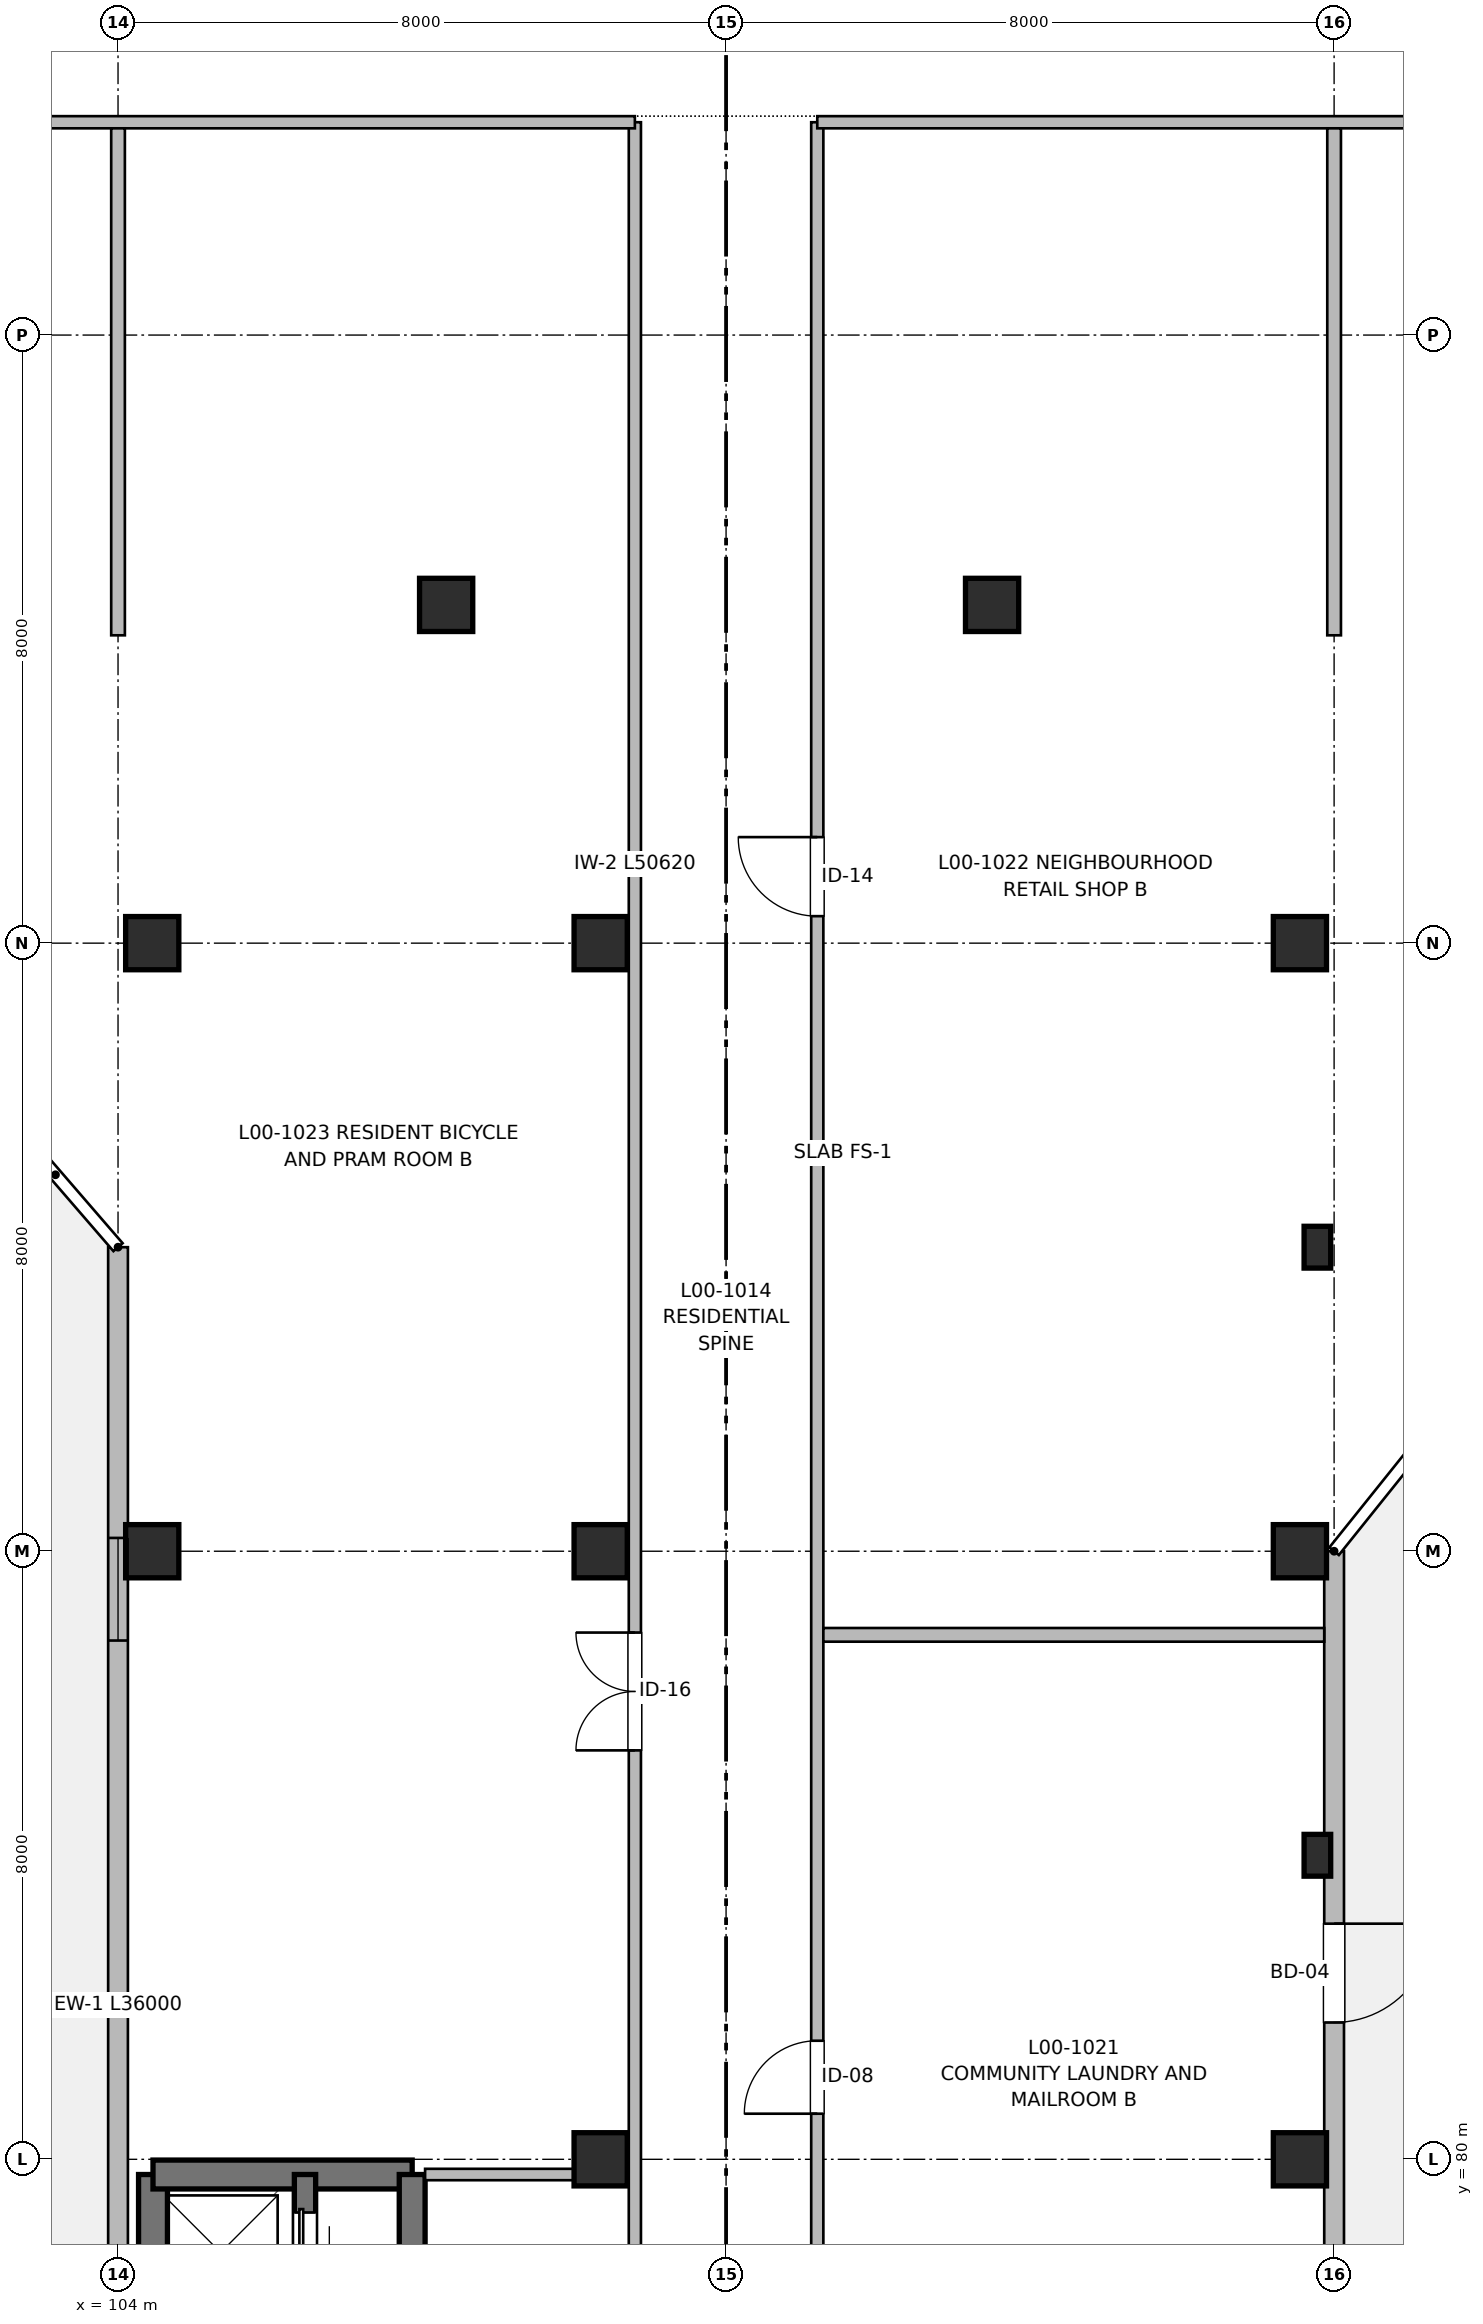
"""IFC4 building model, lengths in metres.
Left out: names, types, materials, properties, quantities, classifications, styles, units other than length and angle.
Written with IfcOpenShell. Run it as: python <this file> out.ifc"""

import sys

from ifc_helpers import new_model, si_unit, direction, frame, frame_2d, origin, origin_2d, place, context, subcontext, project, spatial, rectangle, extrude, element, fill, save


model = new_model("IFC4")
c1 = context("Model", 3, precision=1e-05, world=origin(), true_north=direction((0.0, 1.0)))
c2 = subcontext(c1, "Body", "Model", "MODEL_VIEW")
j1 = project(units=[si_unit("LENGTHUNIT", "METRE"), si_unit("PLANEANGLEUNIT", "RADIAN")], contexts=[c1])
p1 = place(None, origin())
s1 = spatial("IfcSite", under=j1, at=p1, CompositionType="ELEMENT")
p2 = place(p1, origin())
s2 = spatial("IfcBuilding", under=s1, at=p2, CompositionType="ELEMENT")
p3 = place(p2, origin())
s3 = spatial("IfcBuildingStorey", under=s2, at=p3, CompositionType="ELEMENT", Elevation=0.0)
for number, where, z_axis, x_axis in (
    (1, (104.45, 88.0, 0.0), (0.0, 0.0, 1.0), (1.0, 0.0, 0.0)),
    (2, (104.45, 96.0, 0.0), (0.0, 0.0, 1.0), (1.0, 0.0, 0.0)),
    (3, (108.317, 100.45, 0.0), (0.0, 0.0, 1.0), (1.0, 0.0, 0.0)),
    (4, (110.35, 80.0, 0.0), (0.0, 0.0, 1.0), (1.0, 0.0, 0.0)),
    (5, (110.35, 88.0, 0.0), (0.0, 0.0, 1.0), (1.0, 0.0, 0.0)),
    (6, (110.35, 96.0, 0.0), (0.0, 0.0, 1.0), (1.0, 0.0, 0.0)),
    (7, (115.5, 100.45, 0.0), (0.0, 0.0, 1.0), (1.0, 0.0, 0.0)),
    (8, (119.55, 80.0, 0.0), (0.0, 0.0, 1.0), (1.0, 0.0, 0.0)),
    (9, (119.55, 88.0, 0.0), (0.0, 0.0, 1.0), (1.0, 0.0, 0.0)),
    (10, (119.55, 96.0, 0.0), (0.0, 0.0, 1.0), (1.0, 0.0, 0.0)),
):
    element("IfcColumn", number, at=place(p3, frame(where, z_axis=z_axis, x_axis=x_axis)), inside=s3, PredefinedType="COLUMN", context=c2, shape_type="SweptSolid", body=[
        extrude(rectangle(XDim=0.7, YDim=0.7, at=origin_2d()), origin(), (0.0, 0.0, 1.0), 4.16),
    ])
for number, where, z_axis, x_axis in (
    (11, (119.78, 84.0, 0.0), (0.0, 0.0, 1.0), (1.0, 0.0, 0.0)),
    (12, (119.78, 92.0, 0.0), (0.0, 0.0, 1.0), (1.0, 0.0, 0.0)),
):
    element("IfcColumn", number, at=place(p3, frame(where, z_axis=z_axis, x_axis=x_axis)), inside=s3, PredefinedType="PILASTER", context=c2, shape_type="SweptSolid", body=[
        extrude(rectangle(XDim=0.35, YDim=0.55, at=origin_2d()), origin(), (0.0, 0.0, 1.0), 4.16),
    ])
p4 = place(p3, frame((104.46, 67.35, 0.0), z_axis=(0.0, 0.0, 1.0), x_axis=(0.0, 1.0, 0.0)))
e13 = element("IfcWall", 13, at=p4, inside=s3, PredefinedType="SHEAR", context=c2, shape_type="SweptSolid", body=[
    extrude(rectangle(XDim=12.45, YDim=0.38, at=frame_2d((6.225, 0.0))), origin(), (0.0, 0.0, 1.0), 4.16),
])
p5 = place(p4, frame((2.2, 0.0, 1.2)))
e14 = element("IfcOpeningElement", 14, at=p5, cuts=e13, PredefinedType="OPENING", context=c2, shape_type="SweptSolid", body=[
    extrude(rectangle(XDim=0.95, YDim=1.25, at=frame_2d((0.475, 0.625))), frame((0.0, 0.2, 0.0), z_axis=(0.0, -1.0, 0.0), x_axis=(1.0, 0.0, 0.0)), (0.0, 0.0, 1.0), 0.4),
])
p6 = place(p3, frame((104.46, 79.8, 0.0), z_axis=(0.0, 0.0, 1.0), x_axis=(1.0, 0.0, 0.0)))
e15 = element("IfcWall", 15, at=p6, inside=s3, PredefinedType="SHEAR", context=c2, shape_type="SweptSolid", body=[
    extrude(rectangle(XDim=3.41, YDim=0.38, at=frame_2d((1.705, 0.0))), origin(), (0.0, 0.0, 1.0), 4.16),
])
p7 = place(p3, frame((107.87, 79.8, 0.0), z_axis=(0.0, 0.0, 1.0), x_axis=(0.0, -1.0, 0.0)))
e16 = element("IfcWall", 16, at=p7, inside=s3, PredefinedType="SHEAR", context=c2, shape_type="SweptSolid", body=[
    extrude(rectangle(XDim=12.45, YDim=0.34, at=frame_2d((6.225, 0.0))), origin(), (0.0, 0.0, 1.0), 4.16),
])
p8 = place(p7, frame((10.85, 0.0, 0.0)))
e17 = element("IfcOpeningElement", 17, at=p8, cuts=e16, PredefinedType="OPENING", context=c2, shape_type="SweptSolid", body=[
    extrude(rectangle(XDim=1.05, YDim=2.15, at=frame_2d((0.525, 1.075))), frame((0.0, 0.18, 0.0), z_axis=(0.0, -1.0, 0.0), x_axis=(1.0, 0.0, 0.0)), (0.0, 0.0, 1.0), 0.36),
])
p9 = place(p3, frame((106.46, 74.55, 0.0), z_axis=(0.0, 0.0, 1.0), x_axis=(0.0, 1.0, 0.0)))
e18 = element("IfcWall", 18, at=p9, inside=s3, PredefinedType="SHEAR", context=c2, shape_type="SweptSolid", body=[
    extrude(rectangle(XDim=5.25, YDim=0.28, at=frame_2d((2.625, 0.0))), origin(), (0.0, 0.0, 1.0), 4.16),
])
p10 = place(p9, frame((1.15, 0.0, 0.0)))
e19 = element("IfcOpeningElement", 19, at=p10, cuts=e18, PredefinedType="OPENING", context=c2, shape_type="SweptSolid", body=[
    extrude(rectangle(XDim=1.0, YDim=2.15, at=frame_2d((0.5, 1.075))), frame((0.0, 0.15, 0.0), z_axis=(0.0, -1.0, 0.0), x_axis=(1.0, 0.0, 0.0)), (0.0, 0.0, 1.0), 0.3),
])
p11 = place(p9, frame((3.85, 0.0, 0.0)))
e20 = element("IfcOpeningElement", 20, at=p11, cuts=e18, PredefinedType="OPENING", context=c2, shape_type="SweptSolid", body=[
    extrude(rectangle(XDim=0.9, YDim=2.15, at=frame_2d((0.45, 1.075))), frame((0.0, 0.15, 0.0), z_axis=(0.0, -1.0, 0.0), x_axis=(1.0, 0.0, 0.0)), (0.0, 0.0, 1.0), 0.3),
])
p12 = place(p3, frame((120.0, 88.0, 0.0), z_axis=(0.0, 0.0, 1.0), x_axis=(0.0, -1.0, 0.0)))
e21 = element("IfcWall", 21, at=p12, inside=s3, PredefinedType="SOLIDWALL", context=c2, shape_type="SweptSolid", body=[
    extrude(rectangle(XDim=32.0, YDim=0.26, at=frame_2d((16.0, 0.0))), origin(), (0.0, 0.0, 1.0), 3.94),
])
p13 = place(p12, frame((4.9, 0.0, 0.0)))
e22 = element("IfcOpeningElement", 22, at=p13, cuts=e21, PredefinedType="OPENING", context=c2, shape_type="SweptSolid", body=[
    extrude(rectangle(XDim=1.3, YDim=2.2, at=frame_2d((0.65, 1.1))), frame((0.0, 0.14, 0.0), z_axis=(0.0, -1.0, 0.0), x_axis=(1.0, 0.0, 0.0)), (0.0, 0.0, 1.0), 0.28),
])
p14 = place(p12, frame((10.025, 0.0, 0.95)))
e23 = element("IfcOpeningElement", 23, at=p14, cuts=e21, PredefinedType="OPENING", context=c2, shape_type="SweptSolid", body=[
    extrude(rectangle(XDim=1.35, YDim=1.3, at=frame_2d((0.675, 0.65))), frame((0.0, 0.14, 0.0), z_axis=(0.0, -1.0, 0.0), x_axis=(1.0, 0.0, 0.0)), (0.0, 0.0, 1.0), 0.28),
])
p15 = place(p12, frame((20.725, 0.0, 0.95)))
e24 = element("IfcOpeningElement", 24, at=p15, cuts=e21, PredefinedType="OPENING", context=c2, shape_type="SweptSolid", body=[
    extrude(rectangle(XDim=2.15, YDim=1.8, at=frame_2d((1.075, 0.9))), frame((0.0, 0.14, 0.0), z_axis=(0.0, -1.0, 0.0), x_axis=(1.0, 0.0, 0.0)), (0.0, 0.0, 1.0), 0.28),
])
p16 = place(p12, frame((27.325, 0.0, 0.95)))
e25 = element("IfcOpeningElement", 25, at=p16, cuts=e21, PredefinedType="OPENING", context=c2, shape_type="SweptSolid", body=[
    extrude(rectangle(XDim=1.35, YDim=1.3, at=frame_2d((0.675, 0.65))), frame((0.0, 0.14, 0.0), z_axis=(0.0, -1.0, 0.0), x_axis=(1.0, 0.0, 0.0)), (0.0, 0.0, 1.0), 0.28),
])
p17 = place(p3, frame((104.0, 56.0, 0.0), z_axis=(0.0, 0.0, 1.0), x_axis=(0.0, 1.0, 0.0)))
e26 = element("IfcWall", 26, at=p17, inside=s3, PredefinedType="SOLIDWALL", context=c2, shape_type="SweptSolid", body=[
    extrude(rectangle(XDim=36.0, YDim=0.26, at=frame_2d((18.0, 0.0))), origin(), (0.0, 0.0, 1.0), 3.94),
])
p18 = place(p17, frame((3.425, 0.0, 0.95)))
e27 = element("IfcOpeningElement", 27, at=p18, cuts=e26, PredefinedType="OPENING", context=c2, shape_type="SweptSolid", body=[
    extrude(rectangle(XDim=2.15, YDim=1.8, at=frame_2d((1.075, 0.9))), frame((0.0, 0.14, 0.0), z_axis=(0.0, -1.0, 0.0), x_axis=(1.0, 0.0, 0.0)), (0.0, 0.0, 1.0), 0.28),
])
p19 = place(p17, frame((12.825, 0.0, 0.95)))
e28 = element("IfcOpeningElement", 28, at=p19, cuts=e26, PredefinedType="OPENING", context=c2, shape_type="SweptSolid", body=[
    extrude(rectangle(XDim=1.35, YDim=1.3, at=frame_2d((0.675, 0.65))), frame((0.0, 0.14, 0.0), z_axis=(0.0, -1.0, 0.0), x_axis=(1.0, 0.0, 0.0)), (0.0, 0.0, 1.0), 0.28),
])
p20 = place(p17, frame((19.075, 0.0, 0.95)))
e29 = element("IfcOpeningElement", 29, at=p20, cuts=e26, PredefinedType="OPENING", context=c2, shape_type="SweptSolid", body=[
    extrude(rectangle(XDim=2.15, YDim=1.8, at=frame_2d((1.075, 0.9))), frame((0.0, 0.14, 0.0), z_axis=(0.0, -1.0, 0.0), x_axis=(1.0, 0.0, 0.0)), (0.0, 0.0, 1.0), 0.28),
])
p21 = place(p17, frame((30.825, 0.0, 0.95)))
e30 = element("IfcOpeningElement", 30, at=p21, cuts=e26, PredefinedType="OPENING", context=c2, shape_type="SweptSolid", body=[
    extrude(rectangle(XDim=1.35, YDim=1.3, at=frame_2d((0.675, 0.65))), frame((0.0, 0.14, 0.0), z_axis=(0.0, -1.0, 0.0), x_axis=(1.0, 0.0, 0.0)), (0.0, 0.0, 1.0), 0.28),
])
p22 = place(p3, frame((108.04, 79.8, 0.0), z_axis=(0.0, 0.0, 1.0), x_axis=(1.0, 0.0, 0.0)))
e31 = element("IfcWall", 31, at=p22, inside=s3, PredefinedType="PARTITIONING", context=c2, shape_type="SweptSolid", body=[
    extrude(rectangle(XDim=2.68, YDim=0.15, at=frame_2d((1.34, 0.0))), origin(), (0.0, 0.0, 1.0), 3.895),
])
p23 = place(p3, frame((110.8, 56.18, 0.0), z_axis=(0.0, 0.0, 1.0), x_axis=(0.0, 1.0, 0.0)))
e32 = element("IfcWall", 32, at=p23, inside=s3, PredefinedType="PARTITIONING", context=c2, shape_type="SweptSolid", body=[
    extrude(rectangle(XDim=50.62, YDim=0.16, at=frame_2d((25.31, 0.0))), origin(), (0.0, 0.0, 1.0), 3.895),
])
p24 = place(p23, frame((12.82, 0.0, 0.0)))
e33 = element("IfcOpeningElement", 33, at=p24, cuts=e32, PredefinedType="OPENING", context=c2, shape_type="SweptSolid", body=[
    extrude(rectangle(XDim=1.1, YDim=2.15, at=frame_2d((0.55, 1.075))), frame((0.0, 0.09, 0.0), z_axis=(0.0, -1.0, 0.0), x_axis=(1.0, 0.0, 0.0)), (0.0, 0.0, 1.0), 0.18),
])
p25 = place(p23, frame((19.22, 0.0, 0.0)))
e34 = element("IfcOpeningElement", 34, at=p25, cuts=e32, PredefinedType="OPENING", context=c2, shape_type="SweptSolid", body=[
    extrude(rectangle(XDim=1.6, YDim=2.15, at=frame_2d((0.8, 1.075))), frame((0.0, 0.09, 0.0), z_axis=(0.0, -1.0, 0.0), x_axis=(1.0, 0.0, 0.0)), (0.0, 0.0, 1.0), 0.18),
])
p26 = place(p23, frame((3.5, 0.0, 0.0)))
e35 = element("IfcOpeningElement", 35, at=p26, cuts=e32, PredefinedType="OPENING", context=c2, shape_type="SweptSolid", body=[
    extrude(rectangle(XDim=1.05, YDim=2.15, at=frame_2d((0.525, 1.075))), frame((0.0, 0.09, 0.0), z_axis=(0.0, -1.0, 0.0), x_axis=(1.0, 0.0, 0.0)), (0.0, 0.0, 1.0), 0.18),
])
p27 = place(p23, frame((29.2, 0.0, 0.0)))
e36 = element("IfcOpeningElement", 36, at=p27, cuts=e32, PredefinedType="OPENING", context=c2, shape_type="SweptSolid", body=[
    extrude(rectangle(XDim=1.55, YDim=2.2, at=frame_2d((0.775, 1.1))), frame((0.0, 0.09, 0.0), z_axis=(0.0, -1.0, 0.0), x_axis=(1.0, 0.0, 0.0)), (0.0, 0.0, 1.0), 0.18),
])
p28 = place(p3, frame((113.2, 56.18, 0.0), z_axis=(0.0, 0.0, 1.0), x_axis=(0.0, 1.0, 0.0)))
e37 = element("IfcWall", 37, at=p28, inside=s3, PredefinedType="PARTITIONING", context=c2, shape_type="SweptSolid", body=[
    extrude(rectangle(XDim=50.62, YDim=0.16, at=frame_2d((25.31, 0.0))), origin(), (0.0, 0.0, 1.0), 3.895),
])
p29 = place(p28, frame((2.515, 0.0, 0.0)))
e38 = element("IfcOpeningElement", 38, at=p29, cuts=e37, PredefinedType="OPENING", context=c2, shape_type="SweptSolid", body=[
    extrude(rectangle(XDim=1.0, YDim=2.1, at=frame_2d((0.5, 1.05))), frame((0.0, 0.09, 0.0), z_axis=(0.0, -1.0, 0.0), x_axis=(1.0, 0.0, 0.0)), (0.0, 0.0, 1.0), 0.18),
])
p30 = place(p28, frame((8.92, 0.0, 0.0)))
e39 = element("IfcOpeningElement", 39, at=p30, cuts=e37, PredefinedType="OPENING", context=c2, shape_type="SweptSolid", body=[
    extrude(rectangle(XDim=1.0, YDim=2.1, at=frame_2d((0.5, 1.05))), frame((0.0, 0.09, 0.0), z_axis=(0.0, -1.0, 0.0), x_axis=(1.0, 0.0, 0.0)), (0.0, 0.0, 1.0), 0.18),
])
p31 = place(p28, frame((15.42, 0.0, 0.0)))
e40 = element("IfcOpeningElement", 40, at=p31, cuts=e37, PredefinedType="OPENING", context=c2, shape_type="SweptSolid", body=[
    extrude(rectangle(XDim=1.0, YDim=2.1, at=frame_2d((0.5, 1.05))), frame((0.0, 0.09, 0.0), z_axis=(0.0, -1.0, 0.0), x_axis=(1.0, 0.0, 0.0)), (0.0, 0.0, 1.0), 0.18),
])
p32 = place(p28, frame((24.42, 0.0, 0.0)))
e41 = element("IfcOpeningElement", 41, at=p32, cuts=e37, PredefinedType="OPENING", context=c2, shape_type="SweptSolid", body=[
    extrude(rectangle(XDim=0.96, YDim=2.15, at=frame_2d((0.48, 1.075))), frame((0.0, 0.09, 0.0), z_axis=(0.0, -1.0, 0.0), x_axis=(1.0, 0.0, 0.0)), (0.0, 0.0, 1.0), 0.18),
])
p33 = place(p28, frame((40.175, 0.0, 0.0)))
e42 = element("IfcOpeningElement", 42, at=p33, cuts=e37, PredefinedType="OPENING", context=c2, shape_type="SweptSolid", body=[
    extrude(rectangle(XDim=1.04, YDim=2.15, at=frame_2d((0.52, 1.075))), frame((0.0, 0.09, 0.0), z_axis=(0.0, -1.0, 0.0), x_axis=(1.0, 0.0, 0.0)), (0.0, 0.0, 1.0), 0.18),
])
p34 = place(p3, frame((93.68, 106.8, 0.0), z_axis=(0.0, 0.0, 1.0), x_axis=(1.0, 0.0, 0.0)))
e43 = element("IfcWall", 43, at=p34, inside=s3, PredefinedType="PARTITIONING", context=c2, shape_type="SweptSolid", body=[
    extrude(rectangle(XDim=17.12, YDim=0.16, at=frame_2d((8.56, 0.0))), origin(), (0.0, 0.0, 1.0), 3.895),
])
p35 = place(p3, frame((113.2, 106.8, 0.0), z_axis=(0.0, 0.0, 1.0), x_axis=(1.0, 0.0, 0.0)))
e44 = element("IfcWall", 44, at=p35, inside=s3, PredefinedType="PARTITIONING", context=c2, shape_type="SweptSolid", body=[
    extrude(rectangle(XDim=24.12, YDim=0.16, at=frame_2d((12.06, 0.0))), origin(), (0.0, 0.0, 1.0), 3.895),
])
p36 = place(p35, frame((19.575, 0.0, 0.0)))
e45 = element("IfcOpeningElement", 45, at=p36, cuts=e44, PredefinedType="OPENING", context=c2, shape_type="SweptSolid", body=[
    extrude(rectangle(XDim=1.05, YDim=2.15, at=frame_2d((0.525, 1.075))), frame((0.0, 0.09, 0.0), z_axis=(0.0, -1.0, 0.0), x_axis=(1.0, 0.0, 0.0)), (0.0, 0.0, 1.0), 0.18),
])
p37 = place(p35, frame((11.215, 0.0, 0.0)))
e46 = element("IfcOpeningElement", 46, at=p37, cuts=e44, PredefinedType="OPENING", context=c2, shape_type="SweptSolid", body=[
    extrude(rectangle(XDim=0.96, YDim=2.15, at=frame_2d((0.48, 1.075))), frame((0.0, 0.09, 0.0), z_axis=(0.0, -1.0, 0.0), x_axis=(1.0, 0.0, 0.0)), (0.0, 0.0, 1.0), 0.18),
])
for number, where, z_axis, x_axis in (
    (47, (120.0, 100.05, 0.0), (0.0, 0.0, 1.0), (0.0, 1.0, 0.0)),
    (48, (104.0, 100.05, 0.0), (0.0, 0.0, 1.0), (0.0, 1.0, 0.0)),
):
    element("IfcWall", number, at=place(p3, frame(where, z_axis=z_axis, x_axis=x_axis)), inside=s3, PredefinedType="PARTITIONING", context=c2, shape_type="SweptSolid", body=[
        extrude(rectangle(XDim=6.67, YDim=0.18, at=frame_2d((3.335, 0.0))), origin(), (0.0, 0.0, 1.0), 3.895),
    ])
p38 = place(p3, frame((113.28, 86.9, 0.0), z_axis=(0.0, 0.0, 1.0), x_axis=(1.0, 0.0, 0.0)))
e49 = element("IfcWall", 49, at=p38, inside=s3, PredefinedType="PARTITIONING", context=c2, shape_type="SweptSolid", body=[
    extrude(rectangle(XDim=6.59, YDim=0.18, at=frame_2d((3.295, 0.0))), origin(), (0.0, 0.0, 1.0), 3.895),
])
p39 = place(p11, origin())
e50 = element("IfcDoor", 50, at=p39, inside=s3, OperationType="SLIDING_TO_RIGHT", PredefinedType="DOOR", context=c2, shape_type="SweptSolid", body=[
    extrude(rectangle(XDim=0.9, YDim=2.15, at=frame_2d((0.45, 1.075))), frame((0.0, 0.025, 0.0), z_axis=(0.0, -1.0, 0.0), x_axis=(1.0, 0.0, 0.0)), (0.0, 0.0, 1.0), 0.05),
])
fill(e20, e50)
p40 = place(p13, origin())
e51 = element("IfcDoor", 51, at=p40, inside=s3, OperationType="SINGLE_SWING_LEFT", PredefinedType="DOOR", context=c2, shape_type="SweptSolid", body=[
    extrude(rectangle(XDim=1.3, YDim=2.2, at=frame_2d((0.65, 1.1))), frame((0.0, 0.025, 0.0), z_axis=(0.0, -1.0, 0.0), x_axis=(1.0, 0.0, 0.0)), (0.0, 0.0, 1.0), 0.05),
])
fill(e22, e51)
p41 = place(p21, origin())
e52 = element("IfcWindow", 52, at=p41, inside=s3, PartitioningType="SINGLE_PANEL", PredefinedType="WINDOW", context=c2, shape_type="SweptSolid", body=[
    extrude(rectangle(XDim=1.35, YDim=1.3, at=frame_2d((0.675, 0.65))), frame((0.0, 0.03, 0.0), z_axis=(0.0, -1.0, 0.0), x_axis=(1.0, 0.0, 0.0)), (0.0, 0.0, 1.0), 0.06),
])
fill(e30, e52)
p42 = place(p32, origin())
e53 = element("IfcDoor", 53, at=p42, inside=s3, OperationType="SINGLE_SWING_LEFT", PredefinedType="DOOR", context=c2, shape_type="SweptSolid", body=[
    extrude(rectangle(XDim=0.96, YDim=2.15, at=frame_2d((0.48, 1.075))), frame((0.0, 0.025, 0.0), z_axis=(0.0, -1.0, 0.0), x_axis=(1.0, 0.0, 0.0)), (0.0, 0.0, 1.0), 0.05),
])
fill(e41, e53)
p43 = place(p33, origin())
e54 = element("IfcDoor", 54, at=p43, inside=s3, OperationType="SINGLE_SWING_RIGHT", PredefinedType="DOOR", context=c2, shape_type="SweptSolid", body=[
    extrude(rectangle(XDim=1.04, YDim=2.15, at=frame_2d((0.52, 1.075))), frame((0.0, 0.025, 0.0), z_axis=(0.0, -1.0, 0.0), x_axis=(1.0, 0.0, 0.0)), (0.0, 0.0, 1.0), 0.05),
])
fill(e42, e54)
p44 = place(p27, origin())
e55 = element("IfcDoor", 55, at=p44, inside=s3, OperationType="DOUBLE_DOOR_SINGLE_SWING", PredefinedType="DOOR", context=c2, shape_type="SweptSolid", body=[
    extrude(rectangle(XDim=1.55, YDim=2.2, at=frame_2d((0.775, 1.1))), frame((0.0, 0.025, 0.0), z_axis=(0.0, -1.0, 0.0), x_axis=(1.0, 0.0, 0.0)), (0.0, 0.0, 1.0), 0.05),
])
fill(e36, e55)
save(model, sys.argv[1])
